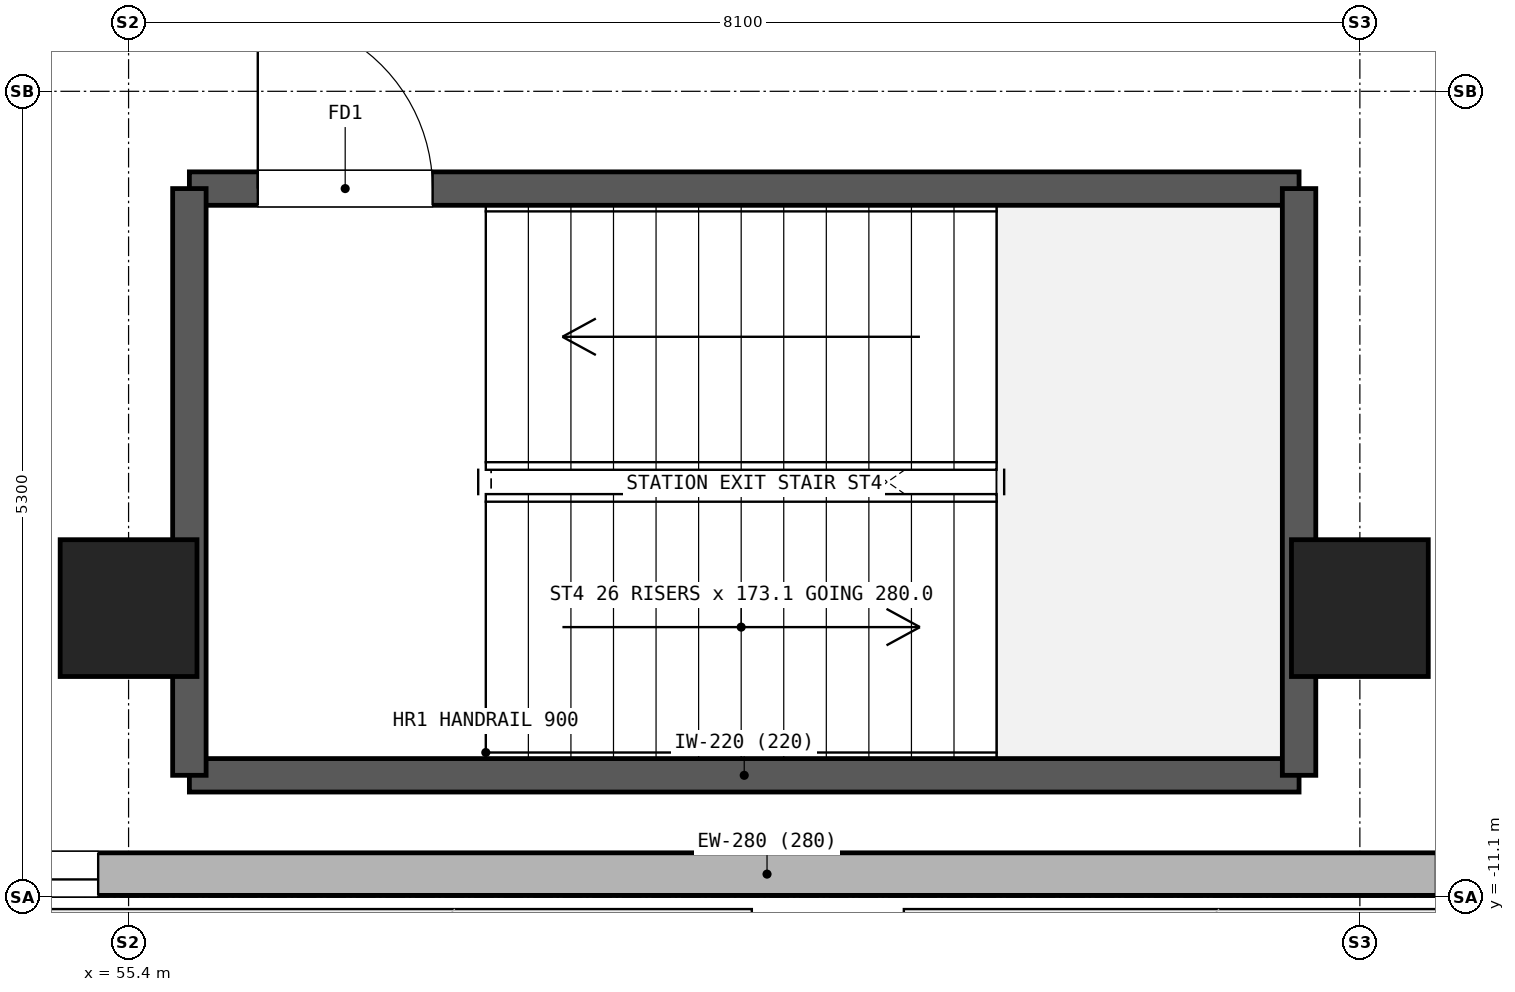
"""IFC4 building model, lengths in metres.
Left out: names, types, materials, properties, quantities, classifications, styles, units other than length and angle.
Written with IfcOpenShell. Run it as: python <this file> out.ifc"""

import sys

from ifc_helpers import new_model, si_unit, direction, frame, frame_2d, origin, origin_2d, place, context, subcontext, project, spatial, rectangle, hollow_rectangle, extrude, source, transform, mapped, element, fill, save


model = new_model("IFC4")
c1 = context("Model", 3, precision=1e-05, world=origin(), true_north=direction((0.0, 1.0)))
c2 = subcontext(c1, "Body", "Model", "MODEL_VIEW")
j1 = project(units=[si_unit("LENGTHUNIT", "METRE"), si_unit("PLANEANGLEUNIT", "RADIAN")], contexts=[c1])
p1 = place(None, origin())
s1 = spatial("IfcSite", under=j1, at=p1, CompositionType="ELEMENT")
p2 = place(p1, origin())
s2 = spatial("IfcBuilding", under=s1, at=p2, CompositionType="ELEMENT")
p3 = place(p2, origin())
s3 = spatial("IfcBuildingStorey", under=s2, at=p3, CompositionType="ELEMENT", Elevation=0.0)
m1 = source(origin(), c2, "Body", "SweptSolid", [
    extrude(hollow_rectangle(XDim=0.7, YDim=0.9, WallThickness=0.04, at=origin_2d()), origin(), (0.0, 0.0, 1.0), 4.18),
])
for number, where, z_axis, x_axis in (
    (1, (55.4, -9.2, 0.0), (0.0, 0.0, 1.0), (1.0, 0.0, 0.0)),
    (2, (63.5, -9.2, 0.0), (0.0, 0.0, 1.0), (1.0, 0.0, 0.0)),
):
    element("IfcColumn", number, at=place(p3, frame(where, z_axis=z_axis, x_axis=x_axis)), inside=s3, PredefinedType="COLUMN", context=c2, shape_type="MappedRepresentation", body=[
        mapped(m1, transform((0.0, 0.0, 0.0), x_axis=(1.0, 0.0, 0.0), y_axis=(0.0, 1.0, 0.0), z_axis=(0.0, 0.0, 1.0), scale=1.0)),
    ])
p4 = place(p3, frame((41.9, -10.95, 0.0), z_axis=(0.0, 0.0, 1.0), x_axis=(1.0, 0.0, 0.0)))
e3 = element("IfcWall", 3, at=p4, inside=s3, PredefinedType="SOLIDWALL", context=c2, shape_type="SweptSolid", body=[
    extrude(rectangle(XDim=29.55, YDim=0.28, at=frame_2d((14.775, 0.0))), origin(), (0.0, 0.0, 1.0), 4.18),
])
p5 = place(p4, frame((6.3, 0.0, 1.1)))
e4 = element("IfcOpeningElement", 4, at=p5, cuts=e3, PredefinedType="OPENING", context=c2, shape_type="SweptSolid", body=[
    extrude(rectangle(XDim=1.6, YDim=1.4, at=frame_2d((0.8, 0.7))), frame((0.0, 0.15, 0.0), z_axis=(0.0, -1.0, 0.0), x_axis=(1.0, 0.0, 0.0)), (0.0, 0.0, 1.0), 0.3),
])
p6 = place(p4, frame((2.5, 0.0, 0.0)))
e5 = element("IfcOpeningElement", 5, at=p6, cuts=e3, PredefinedType="OPENING", context=c2, shape_type="SweptSolid", body=[
    extrude(rectangle(XDim=2.0, YDim=2.4, at=frame_2d((1.0, 1.2))), frame((0.0, 0.15, 0.0), z_axis=(0.0, -1.0, 0.0), x_axis=(1.0, 0.0, 0.0)), (0.0, 0.0, 1.0), 0.3),
])
p7 = place(p4, frame((9.7, 0.0, 0.0)))
e6 = element("IfcOpeningElement", 6, at=p7, cuts=e3, PredefinedType="OPENING", context=c2, shape_type="SweptSolid", body=[
    extrude(rectangle(XDim=3.6, YDim=3.2, at=frame_2d((1.8, 1.6))), frame((0.0, 0.15, 0.0), z_axis=(0.0, -1.0, 0.0), x_axis=(1.0, 0.0, 0.0)), (0.0, 0.0, 1.0), 0.3),
])
p8 = place(p4, frame((22.1, 0.0, 0.0)))
e7 = element("IfcOpeningElement", 7, at=p8, cuts=e3, PredefinedType="OPENING", context=c2, shape_type="SweptSolid", body=[
    extrude(rectangle(XDim=3.6, YDim=3.2, at=frame_2d((1.8, 1.6))), frame((0.0, 0.15, 0.0), z_axis=(0.0, -1.0, 0.0), x_axis=(1.0, 0.0, 0.0)), (0.0, 0.0, 1.0), 0.3),
])
p9 = place(p3, frame((55.8, -10.3, 0.0), z_axis=(0.0, 0.0, 1.0), x_axis=(1.0, 0.0, 0.0)))
e8 = element("IfcWall", 8, at=p9, inside=s3, PredefinedType="SOLIDWALL", context=c2, shape_type="SweptSolid", body=[
    extrude(rectangle(XDim=7.3, YDim=0.22, at=frame_2d((3.65, 0.0))), origin(), (0.0, 0.0, 1.0), 4.18),
])
p10 = place(p3, frame((55.8, -6.44, 0.0), z_axis=(0.0, 0.0, 1.0), x_axis=(1.0, 0.0, 0.0)))
e9 = element("IfcWall", 9, at=p10, inside=s3, PredefinedType="SOLIDWALL", context=c2, shape_type="SweptSolid", body=[
    extrude(rectangle(XDim=7.3, YDim=0.22, at=frame_2d((3.65, 0.0))), origin(), (0.0, 0.0, 1.0), 4.18),
])
p11 = place(p10, frame((0.45, 0.0, 0.0)))
e10 = element("IfcOpeningElement", 10, at=p11, cuts=e9, PredefinedType="OPENING", context=c2, shape_type="SweptSolid", body=[
    extrude(rectangle(XDim=1.15, YDim=2.2, at=frame_2d((0.575, 1.1))), frame((0.0, 0.12, 0.0), z_axis=(0.0, -1.0, 0.0), x_axis=(1.0, 0.0, 0.0)), (0.0, 0.0, 1.0), 0.24),
])
for number, where, z_axis, x_axis in (
    (11, (55.8, -10.3, 0.0), (0.0, 0.0, 1.0), (0.0, 1.0, 0.0)),
    (12, (63.1, -10.3, 0.0), (0.0, 0.0, 1.0), (0.0, 1.0, 0.0)),
):
    element("IfcWall", number, at=place(p3, frame(where, z_axis=z_axis, x_axis=x_axis)), inside=s3, PredefinedType="SOLIDWALL", context=c2, shape_type="SweptSolid", body=[
        extrude(rectangle(XDim=3.86, YDim=0.22, at=frame_2d((1.93, 0.0))), origin(), (0.0, 0.0, 1.0), 4.18),
    ])
p12 = place(p7, origin())
e13 = element("IfcDoor", 13, at=p12, inside=s3, OperationType="ROLLINGUP", PredefinedType="GATE", context=c2, shape_type="SweptSolid", body=[
    extrude(rectangle(XDim=3.6, YDim=3.2, at=frame_2d((1.8, 1.6))), frame((0.0, 0.025, 0.0), z_axis=(0.0, -1.0, 0.0), x_axis=(1.0, 0.0, 0.0)), (0.0, 0.0, 1.0), 0.05),
])
fill(e6, e13)
p13 = place(p11, origin())
e14 = element("IfcDoor", 14, at=p13, inside=s3, OperationType="SINGLE_SWING_LEFT", PredefinedType="DOOR", context=c2, shape_type="SweptSolid", body=[
    extrude(rectangle(XDim=1.15, YDim=2.2, at=frame_2d((0.575, 1.1))), frame((0.0, 0.025, 0.0), z_axis=(0.0, -1.0, 0.0), x_axis=(1.0, 0.0, 0.0)), (0.0, 0.0, 1.0), 0.05),
])
fill(e10, e14)
save(model, sys.argv[1])
